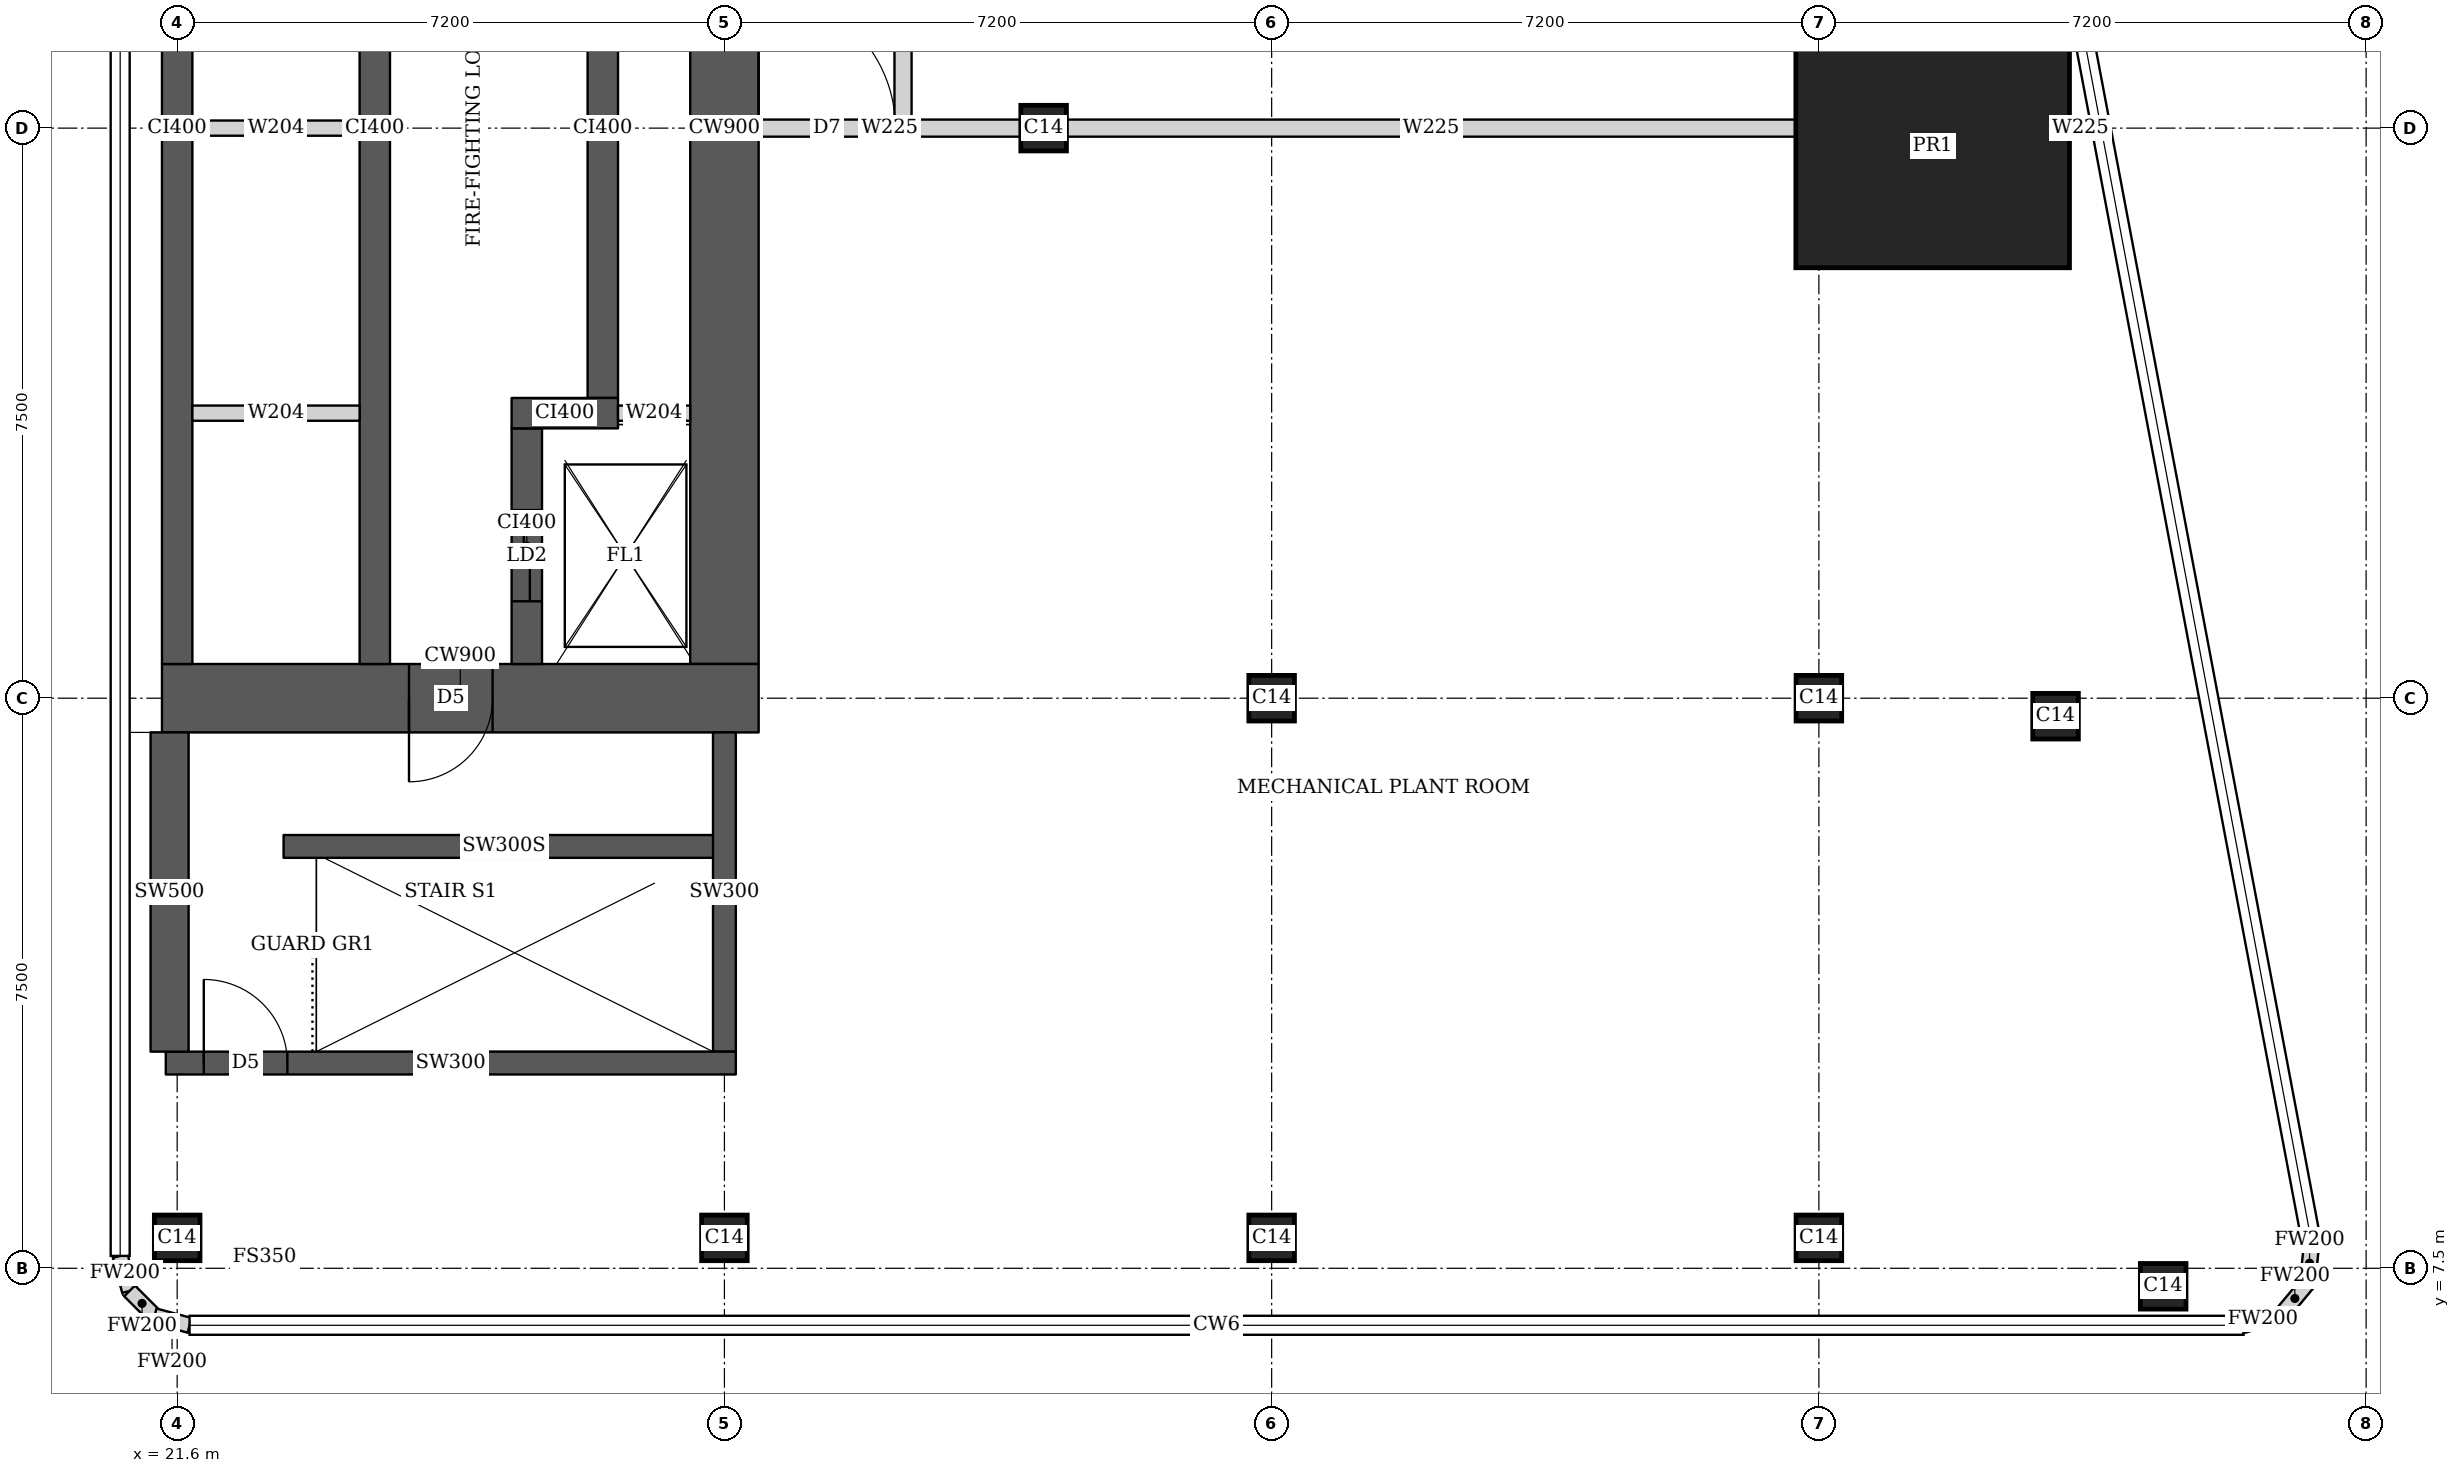
"""IFC4 building model, lengths in metres.
Left out: names, types, materials, properties, quantities, classifications, styles, units other than length and angle.
Written with IfcOpenShell. Run it as: python <this file> out.ifc"""

import sys

from ifc_helpers import new_model, si_unit, direction, frame, frame_2d, origin, origin_2d, place, context, subcontext, project, spatial, rectangle, extrude, element, fill, save


model = new_model("IFC4")
c1 = context("Model", 3, precision=1e-05, world=origin(), true_north=direction((0.0, 1.0)))
c2 = subcontext(c1, "Body", "Model", "MODEL_VIEW")
j1 = project(units=[si_unit("LENGTHUNIT", "METRE"), si_unit("PLANEANGLEUNIT", "RADIAN")], contexts=[c1])
p1 = place(None, origin())
s1 = spatial("IfcSite", under=j1, at=p1, CompositionType="ELEMENT")
p2 = place(p1, origin())
s2 = spatial("IfcBuilding", under=s1, at=p2, CompositionType="ELEMENT")
p3 = place(p2, frame((0.0, 0.0, 301.6)))
s3 = spatial("IfcBuildingStorey", under=s2, at=p3, CompositionType="ELEMENT", Elevation=301.6)
for number, where, z_axis, x_axis in (
    (1, (21.6, 7.9, 0.0), (0.0, 0.0, 1.0), (1.0, 0.0, 0.0)),
    (2, (28.8, 7.9, 0.0), (0.0, 0.0, 1.0), (1.0, 0.0, 0.0)),
    (3, (36.0, 7.9, 0.0), (0.0, 0.0, 1.0), (1.0, 0.0, 0.0)),
    (4, (43.2, 7.9, 0.0), (0.0, 0.0, 1.0), (1.0, 0.0, 0.0)),
    (5, (47.73, 7.263, 0.0), (0.0, 0.0, 1.0), (1.0, 0.0, 0.0)),
    (6, (36.0, 15.0, 0.0), (0.0, 0.0, 1.0), (1.0, 0.0, 0.0)),
    (7, (43.2, 15.0, 0.0), (0.0, 0.0, 1.0), (1.0, 0.0, 0.0)),
    (8, (46.314, 14.763, 0.0), (0.0, 0.0, 1.0), (1.0, 0.0, 0.0)),
    (9, (33.0, 22.5, 0.0), (0.0, 0.0, 1.0), (1.0, 0.0, 0.0)),
):
    element("IfcColumn", number, at=place(p3, frame(where, z_axis=z_axis, x_axis=x_axis)), inside=s3, PredefinedType="COLUMN", context=c2, shape_type="SweptSolid", body=[
        extrude(rectangle(XDim=0.6, YDim=0.6, at=origin_2d()), origin(), (0.0, 0.0, 1.0), 5.6),
    ])
p4 = place(p3, frame((44.697, 22.263, 0.0), z_axis=(0.0, 0.0, 1.0), x_axis=(1.0, 0.0, 0.0)))
e10 = element("IfcColumn", 10, at=p4, inside=s3, PredefinedType="COLUMN", context=c2, shape_type="SweptSolid", body=[
    extrude(rectangle(XDim=3.6, YDim=3.2, at=origin_2d()), origin(), (0.0, 0.0, 1.0), 5.6),
])
p5 = place(p3, frame((21.4, 15.0, 0.0), z_axis=(0.0, 0.0, 1.0), x_axis=(1.0, 0.0, 0.0)))
e11 = element("IfcWall", 11, at=p5, inside=s3, PredefinedType="SHEAR", context=c2, shape_type="SweptSolid", body=[
    extrude(rectangle(XDim=7.85, YDim=0.9, at=frame_2d((3.925, 0.0))), origin(), (0.0, 0.0, 1.0), 5.6),
])
p6 = place(p5, frame((3.25, 0.0, 0.0)))
e12 = element("IfcOpeningElement", 12, at=p6, cuts=e11, PredefinedType="OPENING", context=c2, shape_type="SweptSolid", body=[
    extrude(rectangle(XDim=1.1, YDim=2.1, at=frame_2d((0.55, 1.05))), frame((0.0, 0.46, 0.0), z_axis=(0.0, -1.0, 0.0), x_axis=(1.0, 0.0, 0.0)), (0.0, 0.0, 1.0), 0.92),
])
p7 = place(p3, frame((28.8, 15.45, 0.0), z_axis=(0.0, 0.0, 1.0), x_axis=(0.0, 1.0, 0.0)))
e13 = element("IfcWall", 13, at=p7, inside=s3, PredefinedType="SHEAR", context=c2, shape_type="SweptSolid", body=[
    extrude(rectangle(XDim=14.1, YDim=0.9, at=frame_2d((7.05, 0.0))), origin(), (0.0, 0.0, 1.0), 5.6),
])
for number, where, z_axis, x_axis in (
    (14, (21.6, 15.45, 0.0), (0.0, 0.0, 1.0), (0.0, 1.0, 0.0)),
    (15, (24.2, 15.45, 0.0), (0.0, 0.0, 1.0), (0.0, 1.0, 0.0)),
):
    element("IfcWall", number, at=place(p3, frame(where, z_axis=z_axis, x_axis=x_axis)), inside=s3, PredefinedType="SHEAR", context=c2, shape_type="SweptSolid", body=[
        extrude(rectangle(XDim=14.1, YDim=0.4, at=frame_2d((7.05, 0.0))), origin(), (0.0, 0.0, 1.0), 5.6),
    ])
p8 = place(p3, frame((26.2, 15.45, 0.0), z_axis=(0.0, 0.0, 1.0), x_axis=(0.0, 1.0, 0.0)))
e16 = element("IfcWall", 16, at=p8, inside=s3, PredefinedType="SHEAR", context=c2, shape_type="SweptSolid", body=[
    extrude(rectangle(XDim=3.1, YDim=0.4, at=frame_2d((1.55, 0.0))), origin(), (0.0, 0.0, 1.0), 5.6),
])
p9 = place(p8, frame((0.825, 0.0, 0.0)))
e17 = element("IfcOpeningElement", 17, at=p9, cuts=e16, PredefinedType="OPENING", context=c2, shape_type="SweptSolid", body=[
    extrude(rectangle(XDim=1.2, YDim=2.1, at=frame_2d((0.6, 1.05))), frame((0.0, 0.21, 0.0), z_axis=(0.0, -1.0, 0.0), x_axis=(1.0, 0.0, 0.0)), (0.0, 0.0, 1.0), 0.42),
])
p10 = place(p3, frame((26.0, 18.75, 0.0), z_axis=(0.0, 0.0, 1.0), x_axis=(1.0, 0.0, 0.0)))
e18 = element("IfcWall", 18, at=p10, inside=s3, PredefinedType="SHEAR", context=c2, shape_type="SweptSolid", body=[
    extrude(rectangle(XDim=1.4, YDim=0.4, at=frame_2d((0.7, 0.0))), origin(), (0.0, 0.0, 1.0), 5.6),
])
p11 = place(p3, frame((27.2, 18.95, 0.0), z_axis=(0.0, 0.0, 1.0), x_axis=(0.0, 1.0, 0.0)))
e19 = element("IfcWall", 19, at=p11, inside=s3, PredefinedType="SHEAR", context=c2, shape_type="SweptSolid", body=[
    extrude(rectangle(XDim=7.1, YDim=0.4, at=frame_2d((3.55, 0.0))), origin(), (0.0, 0.0, 1.0), 5.6),
])
p12 = place(p3, frame((21.45, 10.2, 0.0), z_axis=(0.0, 0.0, 1.0), x_axis=(1.0, 0.0, 0.0)))
e20 = element("IfcWall", 20, at=p12, inside=s3, PredefinedType="SHEAR", context=c2, shape_type="SweptSolid", body=[
    extrude(rectangle(XDim=7.5, YDim=0.3, at=frame_2d((3.75, 0.0))), origin(), (0.0, 0.0, 1.0), 5.6),
])
p13 = place(p12, frame((0.5, 0.0, 0.0)))
e21 = element("IfcOpeningElement", 21, at=p13, cuts=e20, PredefinedType="OPENING", context=c2, shape_type="SweptSolid", body=[
    extrude(rectangle(XDim=1.1, YDim=2.1, at=frame_2d((0.55, 1.05))), frame((0.0, 0.16, 0.0), z_axis=(0.0, -1.0, 0.0), x_axis=(1.0, 0.0, 0.0)), (0.0, 0.0, 1.0), 0.32),
])
p14 = place(p3, frame((21.5, 10.35, 0.0), z_axis=(0.0, 0.0, 1.0), x_axis=(0.0, 1.0, 0.0)))
e22 = element("IfcWall", 22, at=p14, inside=s3, PredefinedType="SHEAR", context=c2, shape_type="SweptSolid", body=[
    extrude(rectangle(XDim=4.2, YDim=0.5, at=frame_2d((2.1, 0.0))), origin(), (0.0, 0.0, 1.0), 5.6),
])
p15 = place(p3, frame((28.8, 10.35, 0.0), z_axis=(0.0, 0.0, 1.0), x_axis=(0.0, 1.0, 0.0)))
e23 = element("IfcWall", 23, at=p15, inside=s3, PredefinedType="SHEAR", context=c2, shape_type="SweptSolid", body=[
    extrude(rectangle(XDim=4.2, YDim=0.3, at=frame_2d((2.1, 0.0))), origin(), (0.0, 0.0, 1.0), 5.6),
])
p16 = place(p3, frame((48.787, 6.75, 0.0), z_axis=(0.0, 0.0, 1.0), x_axis=(0.957282247819, 0.289155145225, 0.0)))
e24 = element("IfcWall", 24, at=p16, inside=s3, PredefinedType="SOLIDWALL", context=c2, shape_type="SweptSolid", body=[
    extrude(rectangle(XDim=0.533, YDim=0.2, at=frame_2d((0.266, 0.0))), origin(), (0.0, 0.0, 1.0), 5.35),
])
p17 = place(p3, frame((49.297, 6.904, 0.0), z_axis=(0.0, 0.0, 1.0), x_axis=(0.639255849474, 0.768994121508, 0.0)))
e25 = element("IfcWall", 25, at=p17, inside=s3, PredefinedType="SOLIDWALL", context=c2, shape_type="SweptSolid", body=[
    extrude(rectangle(XDim=0.518, YDim=0.2, at=frame_2d((0.259, 0.0))), origin(), (0.0, 0.0, 1.0), 5.35),
])
p18 = place(p3, frame((49.628, 7.302, 0.0), z_axis=(0.0, 0.0, 1.0), x_axis=(0.105352390132, 0.994434952068, 0.0)))
e26 = element("IfcWall", 26, at=p18, inside=s3, PredefinedType="SOLIDWALL", context=c2, shape_type="SweptSolid", body=[
    extrude(rectangle(XDim=0.533, YDim=0.2, at=frame_2d((0.267, 0.0))), origin(), (0.0, 0.0, 1.0), 5.35),
])
p19 = place(p3, frame((20.85, 7.663, 0.0), z_axis=(0.0, 0.0, 1.0), x_axis=(0.259698463175, -0.965689757751, 0.0)))
e27 = element("IfcWall", 27, at=p19, inside=s3, PredefinedType="SOLIDWALL", context=c2, shape_type="SweptSolid", body=[
    extrude(rectangle(XDim=0.478, YDim=0.2, at=frame_2d((0.239, 0.0))), origin(), (0.0, 0.0, 1.0), 5.35),
])
p20 = place(p3, frame((20.974, 7.202, 0.0), z_axis=(0.0, 0.0, 1.0), x_axis=(0.707106781187, -0.707106781187, 0.0)))
e28 = element("IfcWall", 28, at=p20, inside=s3, PredefinedType="SOLIDWALL", context=c2, shape_type="SweptSolid", body=[
    extrude(rectangle(XDim=0.464, YDim=0.2, at=frame_2d((0.232, 0.0))), origin(), (0.0, 0.0, 1.0), 5.35),
])
p21 = place(p3, frame((21.302, 6.874, 0.0), z_axis=(0.0, 0.0, 1.0), x_axis=(0.965655254015, -0.259826731483, 0.0)))
e29 = element("IfcWall", 29, at=p21, inside=s3, PredefinedType="SOLIDWALL", context=c2, shape_type="SweptSolid", body=[
    extrude(rectangle(XDim=0.477, YDim=0.2, at=frame_2d((0.239, 0.0))), origin(), (0.0, 0.0, 1.0), 5.35),
])
p22 = place(p3, frame((29.25, 22.5, 0.0), z_axis=(0.0, 0.0, 1.0), x_axis=(1.0, 0.0, 0.0)))
e30 = element("IfcWall", 30, at=p22, inside=s3, PredefinedType="SOLIDWALL", context=c2, shape_type="SweptSolid", body=[
    extrude(rectangle(XDim=3.449, YDim=0.225, at=frame_2d((1.725, 0.0))), origin(), (0.0, 0.0, 1.0), 5.35),
])
p23 = place(p22, origin())
e31 = element("IfcOpeningElement", 31, at=p23, cuts=e30, PredefinedType="OPENING", context=c2, shape_type="SweptSolid", body=[
    extrude(rectangle(XDim=1.8, YDim=2.4, at=frame_2d((0.9, 1.2))), frame((0.0, 0.123, 0.0), z_axis=(0.0, -1.0, 0.0), x_axis=(1.0, 0.0, 0.0)), (0.0, 0.0, 1.0), 0.245),
])
p24 = place(p3, frame((33.301, 22.5, 0.0), z_axis=(0.0, 0.0, 1.0), x_axis=(1.0, 0.0, 0.0)))
e32 = element("IfcWall", 32, at=p24, inside=s3, PredefinedType="SOLIDWALL", context=c2, shape_type="SweptSolid", body=[
    extrude(rectangle(XDim=9.595, YDim=0.225, at=frame_2d((4.797, 0.0))), origin(), (0.0, 0.0, 1.0), 4.35),
])
p25 = place(p3, frame((46.498, 22.5, 0.0), z_axis=(0.0, 0.0, 1.0), x_axis=(1.0, 0.0, 0.0)))
e33 = element("IfcWall", 33, at=p25, inside=s3, PredefinedType="SOLIDWALL", context=c2, shape_type="SweptSolid", body=[
    extrude(rectangle(XDim=0.288, YDim=0.225, at=frame_2d((0.144, 0.0))), origin(), (0.0, 0.0, 1.0), 5.35),
])
p26 = place(p3, frame((31.15, 22.613, 0.0), z_axis=(0.0, 0.0, 1.0), x_axis=(0.0, 1.0, 0.0)))
e34 = element("IfcWall", 34, at=p26, inside=s3, PredefinedType="SOLIDWALL", context=c2, shape_type="SweptSolid", body=[
    extrude(rectangle(XDim=14.237, YDim=0.225, at=frame_2d((7.119, 0.0))), origin(), (0.0, 0.0, 1.0), 5.35),
])
p27 = place(p26, frame((3.987, 0.0, 0.0)))
e35 = element("IfcOpeningElement", 35, at=p27, cuts=e34, PredefinedType="OPENING", context=c2, shape_type="SweptSolid", body=[
    extrude(rectangle(XDim=1.8, YDim=2.4, at=frame_2d((0.9, 1.2))), frame((0.0, 0.123, 0.0), z_axis=(0.0, -1.0, 0.0), x_axis=(1.0, 0.0, 0.0)), (0.0, 0.0, 1.0), 0.245),
])
p28 = place(p3, frame((23.0, 13.05, 0.0), z_axis=(0.0, 0.0, 1.0), x_axis=(1.0, 0.0, 0.0)))
e36 = element("IfcWall", 36, at=p28, inside=s3, PredefinedType="SHEAR", context=c2, shape_type="SweptSolid", body=[
    extrude(rectangle(XDim=5.8, YDim=0.3, at=frame_2d((2.9, 0.0))), origin(), (0.0, 0.0, 1.0), 5.35),
])
for number, where, z_axis, x_axis in (
    (37, (21.8, 18.75, 0.0), (0.0, 0.0, 1.0), (1.0, 0.0, 0.0)),
    (38, (21.8, 22.5, 0.0), (0.0, 0.0, 1.0), (1.0, 0.0, 0.0)),
):
    element("IfcWall", number, at=place(p3, frame(where, z_axis=z_axis, x_axis=x_axis)), inside=s3, PredefinedType="SOLIDWALL", context=c2, shape_type="SweptSolid", body=[
        extrude(rectangle(XDim=2.2, YDim=0.2, at=frame_2d((1.1, 0.0))), origin(), (0.0, 0.0, 1.0), 5.35),
    ])
p29 = place(p3, frame((27.4, 18.75, 0.0), z_axis=(0.0, 0.0, 1.0), x_axis=(1.0, 0.0, 0.0)))
e39 = element("IfcWall", 39, at=p29, inside=s3, PredefinedType="SOLIDWALL", context=c2, shape_type="SweptSolid", body=[
    extrude(rectangle(XDim=0.95, YDim=0.2, at=frame_2d((0.475, 0.0))), origin(), (0.0, 0.0, 1.0), 5.35),
])
p30 = place(p23, origin())
e40 = element("IfcDoor", 40, at=p30, inside=s3, OperationType="DOUBLE_DOOR_SINGLE_SWING", PredefinedType="DOOR", context=c2, shape_type="SweptSolid", body=[
    extrude(rectangle(XDim=1.8, YDim=2.4, at=frame_2d((0.9, 1.2))), frame((0.0, 0.025, 0.0), z_axis=(0.0, -1.0, 0.0), x_axis=(1.0, 0.0, 0.0)), (0.0, 0.0, 1.0), 0.05),
])
fill(e31, e40)
p31 = place(p6, origin())
e41 = element("IfcDoor", 41, at=p31, inside=s3, OperationType="SINGLE_SWING_RIGHT", PredefinedType="DOOR", context=c2, shape_type="SweptSolid", body=[
    extrude(rectangle(XDim=1.1, YDim=2.1, at=frame_2d((0.55, 1.05))), frame((0.0, 0.025, 0.0), z_axis=(0.0, -1.0, 0.0), x_axis=(1.0, 0.0, 0.0)), (0.0, 0.0, 1.0), 0.05),
])
fill(e12, e41)
p32 = place(p9, origin())
e42 = element("IfcDoor", 42, at=p32, inside=s3, OperationType="DOUBLE_DOOR_SLIDING", PredefinedType="DOOR", context=c2, shape_type="SweptSolid", body=[
    extrude(rectangle(XDim=1.2, YDim=2.1, at=frame_2d((0.6, 1.05))), frame((0.0, 0.025, 0.0), z_axis=(0.0, -1.0, 0.0), x_axis=(1.0, 0.0, 0.0)), (0.0, 0.0, 1.0), 0.05),
])
fill(e17, e42)
p33 = place(p13, origin())
e43 = element("IfcDoor", 43, at=p33, inside=s3, OperationType="SINGLE_SWING_LEFT", PredefinedType="DOOR", context=c2, shape_type="SweptSolid", body=[
    extrude(rectangle(XDim=1.1, YDim=2.1, at=frame_2d((0.55, 1.05))), frame((0.0, 0.025, 0.0), z_axis=(0.0, -1.0, 0.0), x_axis=(1.0, 0.0, 0.0)), (0.0, 0.0, 1.0), 0.05),
])
fill(e21, e43)
save(model, sys.argv[1])
